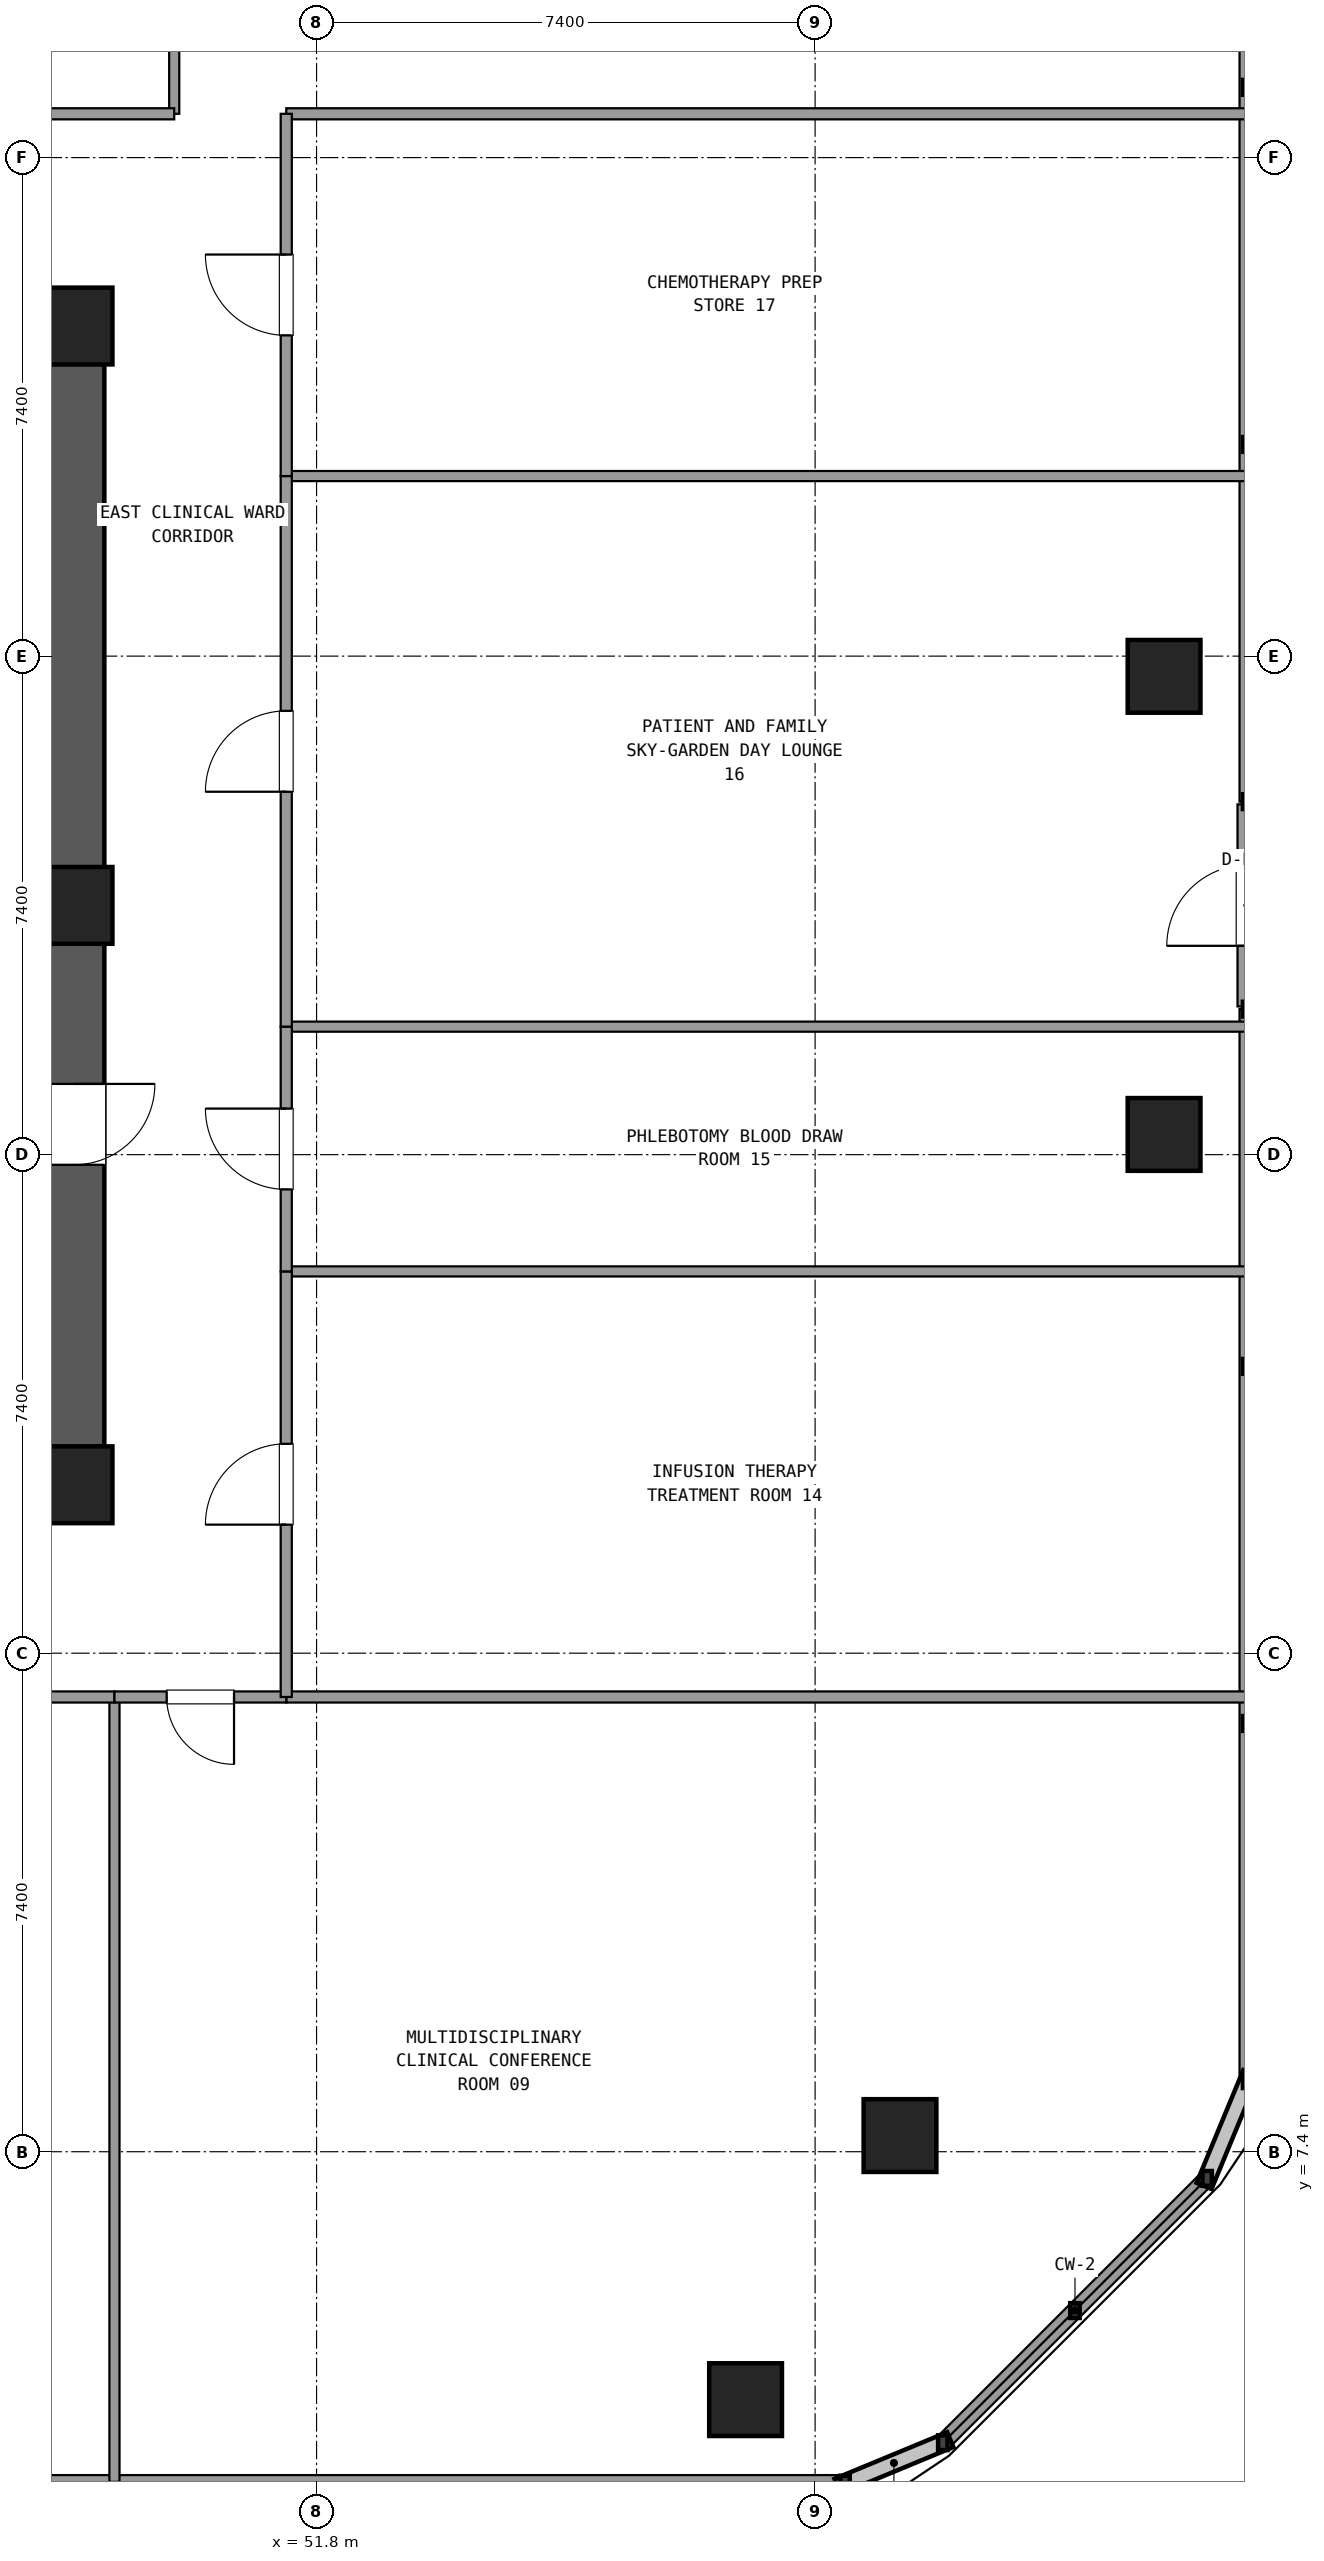
"""IFC4 building model, lengths in metres.
Left out: names, types, materials, properties, quantities, classifications, styles, units other than length and angle.
Written with IfcOpenShell. Run it as: python <this file> out.ifc"""

import sys

from ifc_helpers import new_model, si_unit, direction, frame, frame_2d, origin, origin_2d, place, context, subcontext, project, spatial, rectangle, extrude, element, fill, save


model = new_model("IFC4")
c1 = context("Model", 3, precision=1e-05, world=origin(), true_north=direction((0.0, 1.0)))
c2 = subcontext(c1, "Body", "Model", "MODEL_VIEW")
j1 = project(units=[si_unit("LENGTHUNIT", "METRE"), si_unit("PLANEANGLEUNIT", "RADIAN")], contexts=[c1])
p1 = place(None, origin())
s1 = spatial("IfcSite", under=j1, at=p1, CompositionType="ELEMENT")
p2 = place(p1, origin())
s2 = spatial("IfcBuilding", under=s1, at=p2, CompositionType="ELEMENT")
p3 = place(p2, frame((0.0, 0.0, 56.34)))
s3 = spatial("IfcBuildingStorey", under=s2, at=p3, CompositionType="ELEMENT", Elevation=56.34)
for number, where, z_axis, x_axis in (
    (1, (48.2, 17.3, 0.0), (0.0, 0.0, 1.0), (1.0, 0.0, 0.0)),
    (2, (48.2, 25.9, 0.0), (0.0, 0.0, 1.0), (1.0, 0.0, 0.0)),
    (3, (48.2, 34.5, 0.0), (0.0, 0.0, 1.0), (1.0, 0.0, 0.0)),
):
    element("IfcColumn", number, at=place(p3, frame(where, z_axis=z_axis, x_axis=x_axis)), inside=s3, PredefinedType="COLUMN", context=c2, shape_type="SweptSolid", body=[
        extrude(rectangle(XDim=1.14, YDim=1.14, at=origin_2d()), origin(), (0.0, 0.0, 1.0), 3.6),
    ])
p4 = place(p3, frame((48.2, 17.865, 0.0), z_axis=(0.0, 0.0, 1.0), x_axis=(0.0, 1.0, 0.0)))
e4 = element("IfcWall", 4, at=p4, inside=s3, PredefinedType="SHEAR", context=c2, shape_type="SweptSolid", body=[
    extrude(rectangle(XDim=7.47, YDim=0.9, at=frame_2d((3.735, 0.0))), origin(), (0.0, 0.0, 1.0), 3.32),
])
p5 = place(p4, frame((4.185, 0.0, 0.0)))
e5 = element("IfcOpeningElement", 5, at=p5, cuts=e4, PredefinedType="OPENING", context=c2, shape_type="SweptSolid", body=[
    extrude(rectangle(XDim=1.2, YDim=2.15, at=frame_2d((0.6, 1.075))), frame((0.0, 0.46, 0.0), z_axis=(0.0, -1.0, 0.0), x_axis=(1.0, 0.0, 0.0)), (0.0, 0.0, 1.0), 0.92),
])
p6 = place(p3, frame((48.2, 26.465, 0.0), z_axis=(0.0, 0.0, 1.0), x_axis=(0.0, 1.0, 0.0)))
e6 = element("IfcWall", 6, at=p6, inside=s3, PredefinedType="SHEAR", context=c2, shape_type="SweptSolid", body=[
    extrude(rectangle(XDim=7.47, YDim=0.9, at=frame_2d((3.735, 0.0))), origin(), (0.0, 0.0, 1.0), 3.32),
])
for number, where, z_axis, x_axis in (
    (7, (58.168, 3.72, 0.0), (0.0, 0.0, 1.0), (1.0, 0.0, 0.0)),
    (8, (60.46, 7.64, 0.0), (0.0, 0.0, 1.0), (1.0, 0.0, 0.0)),
    (9, (64.38, 22.5, 0.0), (0.0, 0.0, 1.0), (1.0, 0.0, 0.0)),
    (10, (64.38, 29.3, 0.0), (0.0, 0.0, 1.0), (1.0, 0.0, 0.0)),
):
    element("IfcColumn", number, at=place(p3, frame(where, z_axis=z_axis, x_axis=x_axis)), inside=s3, PredefinedType="COLUMN", context=c2, shape_type="SweptSolid", body=[
        extrude(rectangle(XDim=1.08, YDim=1.08, at=origin_2d()), origin(), (0.0, 0.0, 1.0), 3.6),
    ])
p7 = place(p3, frame((14.355, 2.48, 0.0), z_axis=(0.0, 0.0, 1.0), x_axis=(1.0, 0.0, 0.0)))
e11 = element("IfcWall", 11, at=p7, inside=s3, PredefinedType="SOLIDWALL", context=c2, shape_type="SweptSolid", body=[
    extrude(rectangle(XDim=45.29, YDim=0.24, at=frame_2d((22.645, 0.0))), origin(), (0.0, 0.0, 1.0), 0.85),
])
p8 = place(p3, frame((61.096, 3.081, 0.0), z_axis=(0.0, 0.0, 1.0), x_axis=(0.707128783731, 0.707084777957, 0.0)))
e12 = element("IfcWall", 12, at=p8, inside=s3, PredefinedType="SOLIDWALL", context=c2, shape_type="SweptSolid", body=[
    extrude(rectangle(XDim=5.548, YDim=0.24, at=frame_2d((2.774, 0.0))), origin(), (0.0, 0.0, 1.0), 0.85),
])
p9 = place(p3, frame((65.62, 24.4, 0.0), z_axis=(0.0, 0.0, 1.0), x_axis=(0.0, 1.0, 0.0)))
e13 = element("IfcWall", 13, at=p9, inside=s3, PredefinedType="SOLIDWALL", context=c2, shape_type="SweptSolid", body=[
    extrude(rectangle(XDim=3.0, YDim=0.3, at=frame_2d((1.5, 0.0))), origin(), (0.0, 0.0, 1.0), 2.65),
])
p10 = place(p9, frame((0.9, 0.0, 0.0)))
e14 = element("IfcOpeningElement", 14, at=p10, cuts=e13, PredefinedType="OPENING", context=c2, shape_type="SweptSolid", body=[
    extrude(rectangle(XDim=1.2, YDim=2.2, at=frame_2d((0.6, 1.1))), frame((0.0, 0.16, 0.0), z_axis=(0.0, -1.0, 0.0), x_axis=(1.0, 0.0, 0.0)), (0.0, 0.0, 1.0), 0.32),
])
for number, where, z_axis, x_axis in (
    (15, (65.62, 8.455, 0.0), (0.0, 0.0, 1.0), (0.0, 1.0, 0.0)),
    (16, (65.62, 27.44, 0.0), (0.0, 0.0, 1.0), (0.0, 1.0, 0.0)),
):
    element("IfcWall", number, at=place(p3, frame(where, z_axis=z_axis, x_axis=x_axis)), inside=s3, PredefinedType="SOLIDWALL", context=c2, shape_type="SweptSolid", body=[
        extrude(rectangle(XDim=15.905, YDim=0.24, at=frame_2d((7.953, 0.0))), origin(), (0.0, 0.0, 1.0), 0.85),
    ])
for number, where, z_axis, x_axis in (
    (17, (51.35, 37.65, 0.0), (0.0, 0.0, 1.0), (1.0, 0.0, 0.0)),
    (18, (51.35, 14.15, 0.0), (0.0, 0.0, 1.0), (1.0, 0.0, 0.0)),
):
    element("IfcWall", number, at=place(p3, frame(where, z_axis=z_axis, x_axis=x_axis)), inside=s3, PredefinedType="PARTITIONING", context=c2, shape_type="SweptSolid", body=[
        extrude(rectangle(XDim=14.25, YDim=0.165, at=frame_2d((7.125, 0.0))), origin(), (0.0, 0.0, 1.0), 2.61),
    ])
p11 = place(p3, frame((49.687, 37.65, 0.0), z_axis=(0.0, 0.0, 1.0), x_axis=(0.0, 1.0, 0.0)))
e19 = element("IfcWall", 19, at=p11, inside=s3, PredefinedType="PARTITIONING", context=c2, shape_type="SweptSolid", body=[
    extrude(rectangle(XDim=11.65, YDim=0.15, at=frame_2d((5.825, 0.0))), origin(), (0.0, 0.0, 1.0), 2.61),
])
p12 = place(p3, frame((40.31, 37.65, 0.0), z_axis=(0.0, 0.0, 1.0), x_axis=(1.0, 0.0, 0.0)))
e20 = element("IfcWall", 20, at=p12, inside=s3, PredefinedType="PARTITIONING", context=c2, shape_type="SweptSolid", body=[
    extrude(rectangle(XDim=9.377, YDim=0.165, at=frame_2d((4.688, 0.0))), origin(), (0.0, 0.0, 1.0), 2.61),
])
p13 = place(p12, frame((4.088, 0.0, 0.0)))
e21 = element("IfcOpeningElement", 21, at=p13, cuts=e20, PredefinedType="OPENING", context=c2, shape_type="SweptSolid", body=[
    extrude(rectangle(XDim=1.2, YDim=2.15, at=frame_2d((0.6, 1.075))), frame((0.0, 0.093, 0.0), z_axis=(0.0, -1.0, 0.0), x_axis=(1.0, 0.0, 0.0)), (0.0, 0.0, 1.0), 0.185),
])
p14 = place(p3, frame((48.8, 14.15, 0.0), z_axis=(0.0, 0.0, 1.0), x_axis=(0.0, -1.0, 0.0)))
e22 = element("IfcWall", 22, at=p14, inside=s3, PredefinedType="PARTITIONING", context=c2, shape_type="SweptSolid", body=[
    extrude(rectangle(XDim=11.65, YDim=0.15, at=frame_2d((5.825, 0.0))), origin(), (0.0, 0.0, 1.0), 2.61),
])
p15 = place(p3, frame((40.861, 14.15, 0.0), z_axis=(0.0, 0.0, 1.0), x_axis=(1.0, 0.0, 0.0)))
e23 = element("IfcWall", 23, at=p15, inside=s3, PredefinedType="PARTITIONING", context=c2, shape_type="SweptSolid", body=[
    extrude(rectangle(XDim=7.939, YDim=0.165, at=frame_2d((3.969, 0.0))), origin(), (0.0, 0.0, 1.0), 2.61),
])
p16 = place(p15, frame((3.369, 0.0, 0.0)))
e24 = element("IfcOpeningElement", 24, at=p16, cuts=e23, PredefinedType="OPENING", context=c2, shape_type="SweptSolid", body=[
    extrude(rectangle(XDim=1.2, YDim=2.15, at=frame_2d((0.6, 1.075))), frame((0.0, 0.093, 0.0), z_axis=(0.0, -1.0, 0.0), x_axis=(1.0, 0.0, 0.0)), (0.0, 0.0, 1.0), 0.185),
])
p17 = place(p3, frame((48.8, 14.15, 0.0), z_axis=(0.0, 0.0, 1.0), x_axis=(1.0, 0.0, 0.0)))
e25 = element("IfcWall", 25, at=p17, inside=s3, PredefinedType="PARTITIONING", context=c2, shape_type="SweptSolid", body=[
    extrude(rectangle(XDim=2.55, YDim=0.165, at=frame_2d((1.275, 0.0))), origin(), (0.0, 0.0, 1.0), 2.61),
])
p18 = place(p17, frame((0.775, 0.0, 0.0)))
e26 = element("IfcOpeningElement", 26, at=p18, cuts=e25, PredefinedType="OPENING", context=c2, shape_type="SweptSolid", body=[
    extrude(rectangle(XDim=1.0, YDim=2.15, at=frame_2d((0.5, 1.075))), frame((0.0, 0.093, 0.0), z_axis=(0.0, -1.0, 0.0), x_axis=(1.0, 0.0, 0.0)), (0.0, 0.0, 1.0), 0.185),
])
p19 = place(p3, frame((51.35, 20.467, 0.0), z_axis=(0.0, 0.0, 1.0), x_axis=(1.0, 0.0, 0.0)))
e27 = element("IfcWall", 27, at=p19, inside=s3, PredefinedType="PARTITIONING", context=c2, shape_type="SweptSolid", body=[
    extrude(rectangle(XDim=14.25, YDim=0.15, at=frame_2d((7.125, 0.0))), origin(), (0.0, 0.0, 1.0), 2.61),
])
p20 = place(p3, frame((51.35, 14.15, 0.0), z_axis=(0.0, 0.0, 1.0), x_axis=(0.0, 1.0, 0.0)))
e28 = element("IfcWall", 28, at=p20, inside=s3, PredefinedType="PARTITIONING", context=c2, shape_type="SweptSolid", body=[
    extrude(rectangle(XDim=6.317, YDim=0.165, at=frame_2d((3.159, 0.0))), origin(), (0.0, 0.0, 1.0), 2.61),
])
p21 = place(p20, frame((2.558, 0.0, 0.0)))
e29 = element("IfcOpeningElement", 29, at=p21, cuts=e28, PredefinedType="OPENING", context=c2, shape_type="SweptSolid", body=[
    extrude(rectangle(XDim=1.2, YDim=2.15, at=frame_2d((0.6, 1.075))), frame((0.0, 0.093, 0.0), z_axis=(0.0, -1.0, 0.0), x_axis=(1.0, 0.0, 0.0)), (0.0, 0.0, 1.0), 0.185),
])
p22 = place(p3, frame((51.35, 24.1, 0.0), z_axis=(0.0, 0.0, 1.0), x_axis=(1.0, 0.0, 0.0)))
e30 = element("IfcWall", 30, at=p22, inside=s3, PredefinedType="PARTITIONING", context=c2, shape_type="SweptSolid", body=[
    extrude(rectangle(XDim=14.25, YDim=0.15, at=frame_2d((7.125, 0.0))), origin(), (0.0, 0.0, 1.0), 2.61),
])
p23 = place(p3, frame((51.35, 20.467, 0.0), z_axis=(0.0, 0.0, 1.0), x_axis=(0.0, 1.0, 0.0)))
e31 = element("IfcWall", 31, at=p23, inside=s3, PredefinedType="PARTITIONING", context=c2, shape_type="SweptSolid", body=[
    extrude(rectangle(XDim=3.633, YDim=0.165, at=frame_2d((1.816, 0.0))), origin(), (0.0, 0.0, 1.0), 2.61),
])
p24 = place(p23, frame((1.217, 0.0, 0.0)))
e32 = element("IfcOpeningElement", 32, at=p24, cuts=e31, PredefinedType="OPENING", context=c2, shape_type="SweptSolid", body=[
    extrude(rectangle(XDim=1.2, YDim=2.15, at=frame_2d((0.6, 1.075))), frame((0.0, 0.093, 0.0), z_axis=(0.0, -1.0, 0.0), x_axis=(1.0, 0.0, 0.0)), (0.0, 0.0, 1.0), 0.185),
])
p25 = place(p3, frame((51.35, 32.273, 0.0), z_axis=(0.0, 0.0, 1.0), x_axis=(1.0, 0.0, 0.0)))
e33 = element("IfcWall", 33, at=p25, inside=s3, PredefinedType="PARTITIONING", context=c2, shape_type="SweptSolid", body=[
    extrude(rectangle(XDim=14.25, YDim=0.15, at=frame_2d((7.125, 0.0))), origin(), (0.0, 0.0, 1.0), 2.61),
])
p26 = place(p3, frame((51.35, 24.1, 0.0), z_axis=(0.0, 0.0, 1.0), x_axis=(0.0, 1.0, 0.0)))
e34 = element("IfcWall", 34, at=p26, inside=s3, PredefinedType="PARTITIONING", context=c2, shape_type="SweptSolid", body=[
    extrude(rectangle(XDim=8.173, YDim=0.165, at=frame_2d((4.086, 0.0))), origin(), (0.0, 0.0, 1.0), 2.61),
])
p27 = place(p26, frame((3.487, 0.0, 0.0)))
e35 = element("IfcOpeningElement", 35, at=p27, cuts=e34, PredefinedType="OPENING", context=c2, shape_type="SweptSolid", body=[
    extrude(rectangle(XDim=1.2, YDim=2.15, at=frame_2d((0.6, 1.075))), frame((0.0, 0.093, 0.0), z_axis=(0.0, -1.0, 0.0), x_axis=(1.0, 0.0, 0.0)), (0.0, 0.0, 1.0), 0.185),
])
p28 = place(p3, frame((51.35, 32.273, 0.0), z_axis=(0.0, 0.0, 1.0), x_axis=(0.0, 1.0, 0.0)))
e36 = element("IfcWall", 36, at=p28, inside=s3, PredefinedType="PARTITIONING", context=c2, shape_type="SweptSolid", body=[
    extrude(rectangle(XDim=5.377, YDim=0.165, at=frame_2d((2.688, 0.0))), origin(), (0.0, 0.0, 1.0), 2.61),
])
p29 = place(p28, frame((2.088, 0.0, 0.0)))
e37 = element("IfcOpeningElement", 37, at=p29, cuts=e36, PredefinedType="OPENING", context=c2, shape_type="SweptSolid", body=[
    extrude(rectangle(XDim=1.2, YDim=2.15, at=frame_2d((0.6, 1.075))), frame((0.0, 0.093, 0.0), z_axis=(0.0, -1.0, 0.0), x_axis=(1.0, 0.0, 0.0)), (0.0, 0.0, 1.0), 0.185),
])
p30 = place(p5, frame((1.2, 0.0, 0.0), z_axis=(0.0, 0.0, 1.0), x_axis=(-1.0, 0.0, 0.0)))
e38 = element("IfcDoor", 38, at=p30, inside=s3, OperationType="SINGLE_SWING_RIGHT", PredefinedType="DOOR", context=c2, shape_type="SweptSolid", body=[
    extrude(rectangle(XDim=1.2, YDim=2.15, at=frame_2d((0.6, 1.075))), frame((0.0, 0.025, 0.0), z_axis=(0.0, -1.0, 0.0), x_axis=(1.0, 0.0, 0.0)), (0.0, 0.0, 1.0), 0.05),
])
fill(e5, e38)
p31 = place(p18, frame((1.0, 0.0, 0.0), z_axis=(0.0, 0.0, 1.0), x_axis=(-1.0, 0.0, 0.0)))
e39 = element("IfcDoor", 39, at=p31, inside=s3, OperationType="SINGLE_SWING_RIGHT", PredefinedType="DOOR", context=c2, shape_type="SweptSolid", body=[
    extrude(rectangle(XDim=1.0, YDim=2.15, at=frame_2d((0.5, 1.075))), frame((0.0, 0.025, 0.0), z_axis=(0.0, -1.0, 0.0), x_axis=(1.0, 0.0, 0.0)), (0.0, 0.0, 1.0), 0.05),
])
fill(e26, e39)
p32 = place(p21, origin())
e40 = element("IfcDoor", 40, at=p32, inside=s3, OperationType="SINGLE_SWING_LEFT", PredefinedType="DOOR", context=c2, shape_type="SweptSolid", body=[
    extrude(rectangle(XDim=1.2, YDim=2.15, at=frame_2d((0.6, 1.075))), frame((0.0, 0.025, 0.0), z_axis=(0.0, -1.0, 0.0), x_axis=(1.0, 0.0, 0.0)), (0.0, 0.0, 1.0), 0.05),
])
fill(e29, e40)
p33 = place(p24, origin())
e41 = element("IfcDoor", 41, at=p33, inside=s3, OperationType="SINGLE_SWING_RIGHT", PredefinedType="DOOR", context=c2, shape_type="SweptSolid", body=[
    extrude(rectangle(XDim=1.2, YDim=2.15, at=frame_2d((0.6, 1.075))), frame((0.0, 0.025, 0.0), z_axis=(0.0, -1.0, 0.0), x_axis=(1.0, 0.0, 0.0)), (0.0, 0.0, 1.0), 0.05),
])
fill(e32, e41)
p34 = place(p27, origin())
e42 = element("IfcDoor", 42, at=p34, inside=s3, OperationType="SINGLE_SWING_LEFT", PredefinedType="DOOR", context=c2, shape_type="SweptSolid", body=[
    extrude(rectangle(XDim=1.2, YDim=2.15, at=frame_2d((0.6, 1.075))), frame((0.0, 0.025, 0.0), z_axis=(0.0, -1.0, 0.0), x_axis=(1.0, 0.0, 0.0)), (0.0, 0.0, 1.0), 0.05),
])
fill(e35, e42)
p35 = place(p29, origin())
e43 = element("IfcDoor", 43, at=p35, inside=s3, OperationType="SINGLE_SWING_RIGHT", PredefinedType="DOOR", context=c2, shape_type="SweptSolid", body=[
    extrude(rectangle(XDim=1.2, YDim=2.15, at=frame_2d((0.6, 1.075))), frame((0.0, 0.025, 0.0), z_axis=(0.0, -1.0, 0.0), x_axis=(1.0, 0.0, 0.0)), (0.0, 0.0, 1.0), 0.05),
])
fill(e37, e43)
save(model, sys.argv[1])
